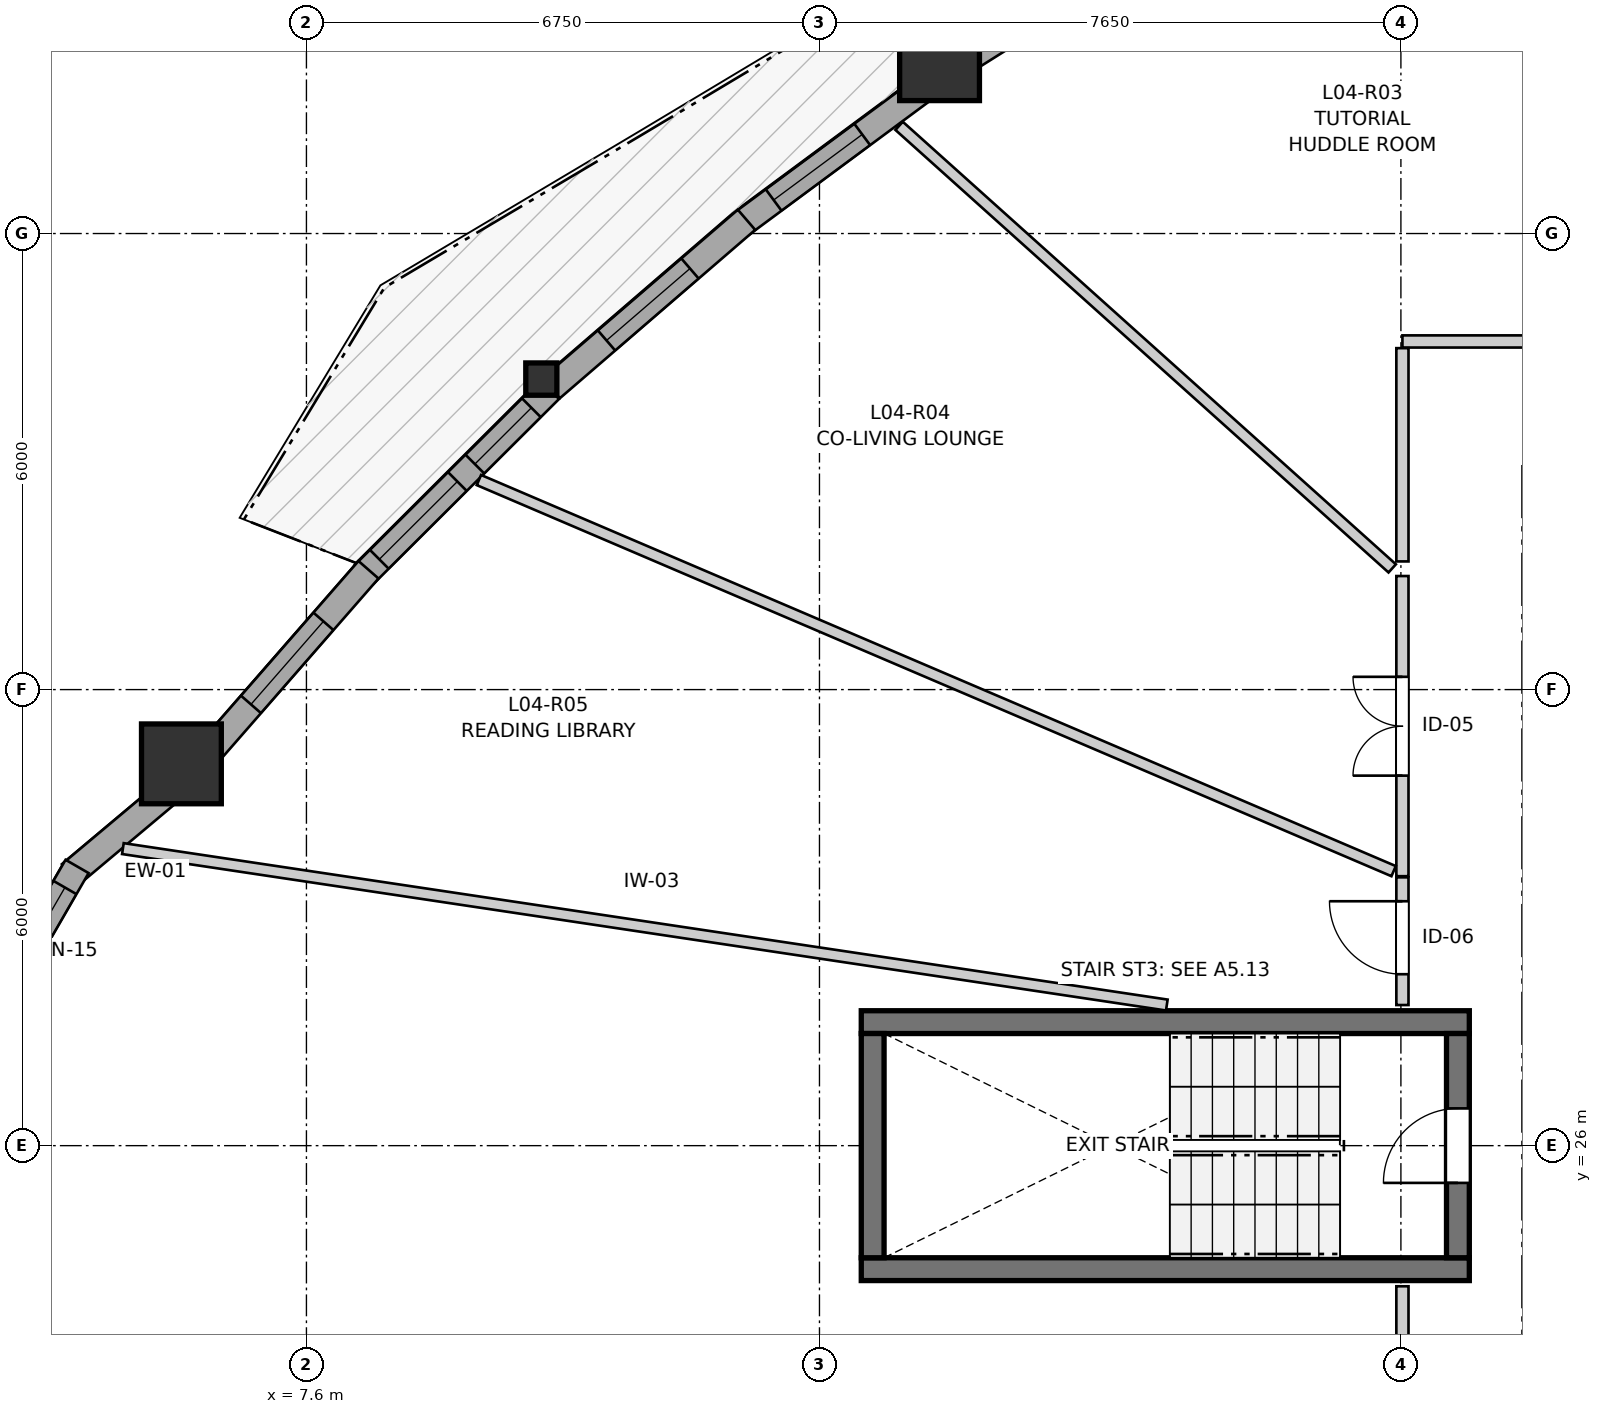
"""IFC4 building model, lengths in metres.
Left out: names, types, materials, properties, quantities, classifications, styles, units other than length and angle.
Written with IfcOpenShell. Run it as: python <this file> out.ifc"""

import sys

from ifc_helpers import new_model, si_unit, direction, frame, frame_2d, origin, origin_2d, place, context, subcontext, project, spatial, rectangle, i_section, extrude, source, transform, mapped, element, fill, save


model = new_model("IFC4")
c1 = context("Model", 3, precision=1e-05, world=origin(), true_north=direction((0.0, 1.0)))
c2 = subcontext(c1, "Body", "Model", "MODEL_VIEW")
j1 = project(units=[si_unit("LENGTHUNIT", "METRE"), si_unit("PLANEANGLEUNIT", "RADIAN")], contexts=[c1])
p1 = place(None, origin())
s1 = spatial("IfcSite", under=j1, at=p1, CompositionType="ELEMENT")
p2 = place(p1, origin())
s2 = spatial("IfcBuilding", under=s1, at=p2, CompositionType="ELEMENT")
p3 = place(p2, frame((0.0, 0.0, 17.4)))
s3 = spatial("IfcBuildingStorey", under=s2, at=p3, CompositionType="ELEMENT", Elevation=17.4)
for number, where, z_axis, x_axis in (
    (1, (14.9, 24.375, 0.0), (0.0, 0.0, 1.0), (1.0, 0.0, 0.0)),
    (2, (22.9, 27.625, 0.0), (0.0, 0.0, 1.0), (-1.0, 0.0, 0.0)),
):
    element("IfcWall", number, at=place(p3, frame(where, z_axis=z_axis, x_axis=x_axis)), inside=s3, PredefinedType="SHEAR", context=c2, shape_type="SweptSolid", body=[
        extrude(rectangle(XDim=8.0, YDim=0.3, at=frame_2d((4.0, 0.0))), origin(), (0.0, 0.0, 1.0), 2.94),
    ])
p4 = place(p3, frame((15.05, 27.475, 0.0), z_axis=(0.0, 0.0, 1.0), x_axis=(0.0, -1.0, 0.0)))
e3 = element("IfcWall", 3, at=p4, inside=s3, PredefinedType="SHEAR", context=c2, shape_type="SweptSolid", body=[
    extrude(rectangle(XDim=2.95, YDim=0.3, at=frame_2d((1.475, 0.0))), origin(), (0.0, 0.0, 1.0), 2.94),
])
p5 = place(p3, frame((22.75, 24.525, 0.0), z_axis=(0.0, 0.0, 1.0), x_axis=(0.0, 1.0, 0.0)))
e4 = element("IfcWall", 4, at=p5, inside=s3, PredefinedType="SHEAR", context=c2, shape_type="SweptSolid", body=[
    extrude(rectangle(XDim=2.95, YDim=0.3, at=frame_2d((1.475, 0.0))), origin(), (0.0, 0.0, 1.0), 2.94),
])
p6 = place(p5, frame((0.985, 0.0, 0.0)))
e5 = element("IfcOpeningElement", 5, at=p6, cuts=e4, PredefinedType="OPENING", context=c2, shape_type="SweptSolid", body=[
    extrude(rectangle(XDim=0.98, YDim=2.15, at=frame_2d((0.49, 1.075))), frame((0.0, 0.16, 0.0), z_axis=(0.0, -1.0, 0.0), x_axis=(1.0, 0.0, 0.0)), (0.0, 0.0, 1.0), 0.32),
])
m1 = source(origin(), c2, "Body", "SweptSolid", [
    extrude(rectangle(XDim=1.05, YDim=1.05, at=origin_2d()), origin(), (0.0, 0.0, 1.0), 2.94),
])
for number, where, z_axis, x_axis in (
    (6, (5.955, 31.023, 0.0), (0.0, 0.0, 1.0), (1.0, 0.0, 0.0)),
    (7, (15.93, 40.274, 0.0), (0.0, 0.0, 1.0), (1.0, 0.0, 0.0)),
):
    element("IfcColumn", number, at=place(p3, frame(where, z_axis=z_axis, x_axis=x_axis)), inside=s3, PredefinedType="COLUMN", context=c2, shape_type="MappedRepresentation", body=[
        mapped(m1, transform((0.0, 0.0, 0.0), x_axis=(1.0, 0.0, 0.0), y_axis=(0.0, 1.0, 0.0), z_axis=(0.0, 0.0, 1.0), scale=1.0)),
    ])
m2 = source(origin(), c2, "Body", "SweptSolid", [
    extrude(i_section(OverallWidth=0.409, OverallDepth=0.425, WebThickness=0.03, FlangeThickness=0.048, FilletRadius=0.015, at=origin_2d()), origin(), (0.0, 0.0, 1.0), 2.94),
])
p7 = place(p3, frame((10.69, 36.085, 0.0), z_axis=(0.0, 0.0, 1.0), x_axis=(1.0, 0.0, 0.0)))
e8 = element("IfcColumn", 8, at=p7, inside=s3, PredefinedType="PILASTER", context=c2, shape_type="MappedRepresentation", body=[
    mapped(m2, transform((0.0, 0.0, 0.0), x_axis=(1.0, 0.0, 0.0), y_axis=(0.0, 1.0, 0.0), z_axis=(0.0, 0.0, 1.0), scale=1.0)),
])
p8 = place(p3, frame((5.838, 30.696, 0.0), z_axis=(0.0, 0.0, 1.0), x_axis=(-0.766001205563, -0.64283913468, 0.0)))
e9 = element("IfcWall", 9, at=p8, inside=s3, PredefinedType="SOLIDWALL", context=c2, shape_type="SweptSolid", body=[
    extrude(rectangle(XDim=1.752, YDim=0.35, at=frame_2d((0.876, 0.0))), origin(), (0.0, 0.0, 1.0), 2.42),
])
p9 = place(p3, frame((4.583, 29.674, 0.0), z_axis=(0.0, 0.0, 1.0), x_axis=(-0.499995423472, -0.866028046028, 0.0)))
e10 = element("IfcWall", 10, at=p9, inside=s3, PredefinedType="SOLIDWALL", context=c2, shape_type="SweptSolid", body=[
    extrude(rectangle(XDim=2.09, YDim=0.35, at=frame_2d((1.045, 0.0))), origin(), (0.0, 0.0, 1.0), 2.42),
])
p10 = place(p9, frame((0.32, 0.0, 0.82)))
e11 = element("IfcOpeningElement", 11, at=p10, cuts=e10, PredefinedType="OPENING", context=c2, shape_type="SweptSolid", body=[
    extrude(rectangle(XDim=1.45, YDim=1.25, at=frame_2d((0.725, 0.625))), frame((0.0, 0.185, 0.0), z_axis=(0.0, -1.0, 0.0), x_axis=(1.0, 0.0, 0.0)), (0.0, 0.0, 1.0), 0.37),
])
p11 = place(p3, frame((3.537, 24.137, 0.0), z_axis=(0.0, 0.0, 1.0), x_axis=(0.499995423472, -0.866028046028, 0.0)))
e12 = element("IfcWall", 12, at=p11, inside=s3, PredefinedType="SOLIDWALL", context=c2, shape_type="SweptSolid", body=[
    extrude(rectangle(XDim=2.09, YDim=0.35, at=frame_2d((1.045, 0.0))), origin(), (0.0, 0.0, 1.0), 2.42),
])
p12 = place(p11, frame((0.32, 0.0, 0.82)))
e13 = element("IfcOpeningElement", 13, at=p12, cuts=e12, PredefinedType="OPENING", context=c2, shape_type="SweptSolid", body=[
    extrude(rectangle(XDim=1.45, YDim=1.25, at=frame_2d((0.725, 0.625))), frame((0.0, 0.185, 0.0), z_axis=(0.0, -1.0, 0.0), x_axis=(1.0, 0.0, 0.0)), (0.0, 0.0, 1.0), 0.37),
])
p13 = place(p3, frame((18.864, 41.913, 0.0), z_axis=(0.0, 0.0, 1.0), x_axis=(-0.84643287852, -0.532495429239, 0.0)))
e14 = element("IfcWall", 14, at=p13, inside=s3, PredefinedType="SOLIDWALL", context=c2, shape_type="SweptSolid", body=[
    extrude(rectangle(XDim=3.056, YDim=0.35, at=frame_2d((1.528, 0.0))), origin(), (0.0, 0.0, 1.0), 2.42),
])
p14 = place(p13, frame((0.808, 0.0, 0.82)))
e15 = element("IfcOpeningElement", 15, at=p14, cuts=e14, PredefinedType="OPENING", context=c2, shape_type="SweptSolid", body=[
    extrude(rectangle(XDim=1.45, YDim=1.25, at=frame_2d((0.725, 0.625))), frame((0.0, 0.185, 0.0), z_axis=(0.0, -1.0, 0.0), x_axis=(1.0, 0.0, 0.0)), (0.0, 0.0, 1.0), 0.37),
])
p15 = place(p3, frame((15.793, 39.955, 0.0), z_axis=(0.0, 0.0, 1.0), x_axis=(-0.803813051054, -0.594881987419, 0.0)))
e16 = element("IfcWall", 16, at=p15, inside=s3, PredefinedType="SOLIDWALL", context=c2, shape_type="SweptSolid", body=[
    extrude(rectangle(XDim=3.075, YDim=0.35, at=frame_2d((1.538, 0.0))), origin(), (0.0, 0.0, 1.0), 2.42),
])
p16 = place(p15, frame((1.095, 0.0, 0.82)))
e17 = element("IfcOpeningElement", 17, at=p16, cuts=e16, PredefinedType="OPENING", context=c2, shape_type="SweptSolid", body=[
    extrude(rectangle(XDim=1.45, YDim=1.25, at=frame_2d((0.725, 0.625))), frame((0.0, 0.185, 0.0), z_axis=(0.0, -1.0, 0.0), x_axis=(1.0, 0.0, 0.0)), (0.0, 0.0, 1.0), 0.37),
])
p17 = place(p3, frame((13.39, 38.181, 0.0), z_axis=(0.0, 0.0, 1.0), x_axis=(-0.757476213352, -0.652862762153, 0.0)))
e18 = element("IfcWall", 18, at=p17, inside=s3, PredefinedType="SOLIDWALL", context=c2, shape_type="SweptSolid", body=[
    extrude(rectangle(XDim=3.393, YDim=0.35, at=frame_2d((1.697, 0.0))), origin(), (0.0, 0.0, 1.0), 2.42),
])
p18 = place(p17, frame((0.982, 0.0, 0.82)))
e19 = element("IfcOpeningElement", 19, at=p18, cuts=e18, PredefinedType="OPENING", context=c2, shape_type="SweptSolid", body=[
    extrude(rectangle(XDim=1.45, YDim=1.25, at=frame_2d((0.725, 0.625))), frame((0.0, 0.185, 0.0), z_axis=(0.0, -1.0, 0.0), x_axis=(1.0, 0.0, 0.0)), (0.0, 0.0, 1.0), 0.37),
])
p19 = place(p3, frame((10.8, 35.947, 0.0), z_axis=(0.0, 0.0, 1.0), x_axis=(-0.708379570295, -0.705831696928, 0.0)))
e20 = element("IfcWall", 20, at=p19, inside=s3, PredefinedType="SOLIDWALL", context=c2, shape_type="SweptSolid", body=[
    extrude(rectangle(XDim=3.449, YDim=0.35, at=frame_2d((1.725, 0.0))), origin(), (0.0, 0.0, 1.0), 2.42),
])
p20 = place(p19, frame((0.339, 0.0, 0.82)))
e21 = element("IfcOpeningElement", 21, at=p20, cuts=e20, PredefinedType="OPENING", context=c2, shape_type="SweptSolid", body=[
    extrude(rectangle(XDim=1.05, YDim=1.45, at=frame_2d((0.525, 0.725))), frame((0.0, 0.185, 0.0), z_axis=(0.0, -1.0, 0.0), x_axis=(1.0, 0.0, 0.0)), (0.0, 0.0, 1.0), 0.37),
])
p21 = place(p19, frame((1.713, 0.0, 0.82)))
e22 = element("IfcOpeningElement", 22, at=p21, cuts=e20, PredefinedType="OPENING", context=c2, shape_type="SweptSolid", body=[
    extrude(rectangle(XDim=1.45, YDim=1.25, at=frame_2d((0.725, 0.625))), frame((0.0, 0.185, 0.0), z_axis=(0.0, -1.0, 0.0), x_axis=(1.0, 0.0, 0.0)), (0.0, 0.0, 1.0), 0.37),
])
p22 = place(p3, frame((8.417, 33.577, 0.0), z_axis=(0.0, 0.0, 1.0), x_axis=(-0.657597964565, -0.75336904436, 0.0)))
e23 = element("IfcWall", 23, at=p22, inside=s3, PredefinedType="SOLIDWALL", context=c2, shape_type="SweptSolid", body=[
    extrude(rectangle(XDim=3.243, YDim=0.35, at=frame_2d((1.621, 0.0))), origin(), (0.0, 0.0, 1.0), 2.42),
])
p23 = place(p22, frame((0.901, 0.0, 0.82)))
e24 = element("IfcOpeningElement", 24, at=p23, cuts=e23, PredefinedType="OPENING", context=c2, shape_type="SweptSolid", body=[
    extrude(rectangle(XDim=1.45, YDim=1.25, at=frame_2d((0.725, 0.625))), frame((0.0, 0.185, 0.0), z_axis=(0.0, -1.0, 0.0), x_axis=(1.0, 0.0, 0.0)), (0.0, 0.0, 1.0), 0.37),
])
p24 = place(p3, frame((22.02, 16.616, 0.0), z_axis=(0.0, 0.0, 1.0), x_axis=(0.0, 1.0, 0.0)))
e25 = element("IfcWall", 25, at=p24, inside=s3, PredefinedType="PARTITIONING", context=c2, shape_type="SweptSolid", body=[
    extrude(rectangle(XDim=7.534, YDim=0.16, at=frame_2d((3.767, 0.0))), origin(), (0.0, 0.0, 1.0), 2.94),
])
p25 = place(p24, frame((2.98, 0.0, 0.0)))
e26 = element("IfcOpeningElement", 26, at=p25, cuts=e25, PredefinedType="OPENING", context=c2, shape_type="SweptSolid", body=[
    extrude(rectangle(XDim=1.3, YDim=2.1, at=frame_2d((0.65, 1.05))), frame((0.0, 0.09, 0.0), z_axis=(0.0, -1.0, 0.0), x_axis=(1.0, 0.0, 0.0)), (0.0, 0.0, 1.0), 0.18),
])
p26 = place(p3, frame((22.02, 36.58, 0.0), z_axis=(0.0, 0.0, 1.0), x_axis=(1.0, 0.0, 0.0)))
e27 = element("IfcWall", 27, at=p26, inside=s3, PredefinedType="PARTITIONING", context=c2, shape_type="SweptSolid", body=[
    extrude(rectangle(XDim=4.874, YDim=0.16, at=frame_2d((2.437, 0.0))), origin(), (0.0, 0.0, 1.0), 2.548),
])
p27 = place(p26, frame((1.779, 0.0, 0.0)))
e28 = element("IfcOpeningElement", 28, at=p27, cuts=e27, PredefinedType="OPENING", context=c2, shape_type="SweptSolid", body=[
    extrude(rectangle(XDim=1.3, YDim=2.1, at=frame_2d((0.65, 1.05))), frame((0.0, 0.09, 0.0), z_axis=(0.0, -1.0, 0.0), x_axis=(1.0, 0.0, 0.0)), (0.0, 0.0, 1.0), 0.18),
])
p28 = place(p3, frame((22.02, 29.545, 0.0), z_axis=(0.0, 0.0, 1.0), x_axis=(0.0, 1.0, 0.0)))
e29 = element("IfcWall", 29, at=p28, inside=s3, PredefinedType="PARTITIONING", context=c2, shape_type="SweptSolid", body=[
    extrude(rectangle(XDim=3.949, YDim=0.16, at=frame_2d((1.975, 0.0))), origin(), (0.0, 0.0, 1.0), 2.94),
])
p29 = place(p28, frame((1.323, 0.0, 0.0)))
e30 = element("IfcOpeningElement", 30, at=p29, cuts=e29, PredefinedType="OPENING", context=c2, shape_type="SweptSolid", body=[
    extrude(rectangle(XDim=1.3, YDim=2.1, at=frame_2d((0.65, 1.05))), frame((0.0, 0.09, 0.0), z_axis=(0.0, -1.0, 0.0), x_axis=(1.0, 0.0, 0.0)), (0.0, 0.0, 1.0), 0.18),
])
p30 = place(p3, frame((22.02, 27.85, 0.0), z_axis=(0.0, 0.0, 1.0), x_axis=(0.0, 1.0, 0.0)))
e31 = element("IfcWall", 31, at=p30, inside=s3, PredefinedType="PARTITIONING", context=c2, shape_type="SweptSolid", body=[
    extrude(rectangle(XDim=1.68, YDim=0.16, at=frame_2d((0.84, 0.0))), origin(), (0.0, 0.0, 1.0), 2.94),
])
p31 = place(p30, frame((0.406, 0.0, 0.0)))
e32 = element("IfcOpeningElement", 32, at=p31, cuts=e31, PredefinedType="OPENING", context=c2, shape_type="SweptSolid", body=[
    extrude(rectangle(XDim=0.96, YDim=2.1, at=frame_2d((0.48, 1.05))), frame((0.0, 0.09, 0.0), z_axis=(0.0, -1.0, 0.0), x_axis=(1.0, 0.0, 0.0)), (0.0, 0.0, 1.0), 0.18),
])
p32 = place(p3, frame((5.185, 29.908, 0.0), z_axis=(0.0, 0.0, 1.0), x_axis=(0.988958777333, -0.148190879394, 0.0)))
e33 = element("IfcWall", 33, at=p32, inside=s3, PredefinedType="PARTITIONING", context=c2, shape_type="SweptSolid", body=[
    extrude(rectangle(XDim=13.888, YDim=0.145, at=frame_2d((6.944, 0.0))), origin(), (0.0, 0.0, 1.0), 2.94),
])
p33 = place(p3, frame((9.869, 34.757, 0.0), z_axis=(0.0, 0.0, 1.0), x_axis=(0.919492001568, -0.393108711493, 0.0)))
e34 = element("IfcWall", 34, at=p33, inside=s3, PredefinedType="PARTITIONING", context=c2, shape_type="SweptSolid", body=[
    extrude(rectangle(XDim=13.089, YDim=0.145, at=frame_2d((6.544, 0.0))), origin(), (0.0, 0.0, 1.0), 2.94),
])
p34 = place(p3, frame((15.398, 39.417, 0.0), z_axis=(0.0, 0.0, 1.0), x_axis=(0.744248709075, -0.667902581998, 0.0)))
e35 = element("IfcWall", 35, at=p34, inside=s3, PredefinedType="PARTITIONING", context=c2, shape_type="SweptSolid", body=[
    extrude(rectangle(XDim=8.717, YDim=0.145, at=frame_2d((4.359, 0.0))), origin(), (0.0, 0.0, 1.0), 2.94),
])
p35 = place(p3, frame((22.02, 33.686, 0.0), z_axis=(0.0, 0.0, 1.0), x_axis=(0.0, 1.0, 0.0)))
e36 = element("IfcWall", 36, at=p35, inside=s3, PredefinedType="PARTITIONING", context=c2, shape_type="SweptSolid", body=[
    extrude(rectangle(XDim=2.806, YDim=0.16, at=frame_2d((1.403, 0.0))), origin(), (0.0, 0.0, 1.0), 2.94),
])
m3 = source(origin(), c2, "Body", "SweptSolid", [
    extrude(rectangle(XDim=1.45, YDim=1.25, at=frame_2d((0.725, 0.625))), frame((0.0, 0.03, 0.0), z_axis=(0.0, -1.0, 0.0), x_axis=(1.0, 0.0, 0.0)), (0.0, 0.0, 1.0), 0.06),
])
p36 = place(p10, origin())
e37 = element("IfcWindow", 37, at=p36, inside=s3, PartitioningType="SINGLE_PANEL", PredefinedType="WINDOW", context=c2, shape_type="MappedRepresentation", body=[
    mapped(m3, transform((0.0, 0.0, 0.0), x_axis=(1.0, 0.0, 0.0), y_axis=(0.0, 1.0, 0.0), z_axis=(0.0, 0.0, 1.0), scale=1.0)),
])
fill(e11, e37)
p37 = place(p12, origin())
e38 = element("IfcWindow", 38, at=p37, inside=s3, PartitioningType="SINGLE_PANEL", PredefinedType="WINDOW", context=c2, shape_type="MappedRepresentation", body=[
    mapped(m3, transform((0.0, 0.0, 0.0), x_axis=(1.0, 0.0, 0.0), y_axis=(0.0, 1.0, 0.0), z_axis=(0.0, 0.0, 1.0), scale=1.0)),
])
fill(e13, e38)
p38 = place(p16, origin())
e39 = element("IfcWindow", 39, at=p38, inside=s3, PartitioningType="SINGLE_PANEL", PredefinedType="WINDOW", context=c2, shape_type="MappedRepresentation", body=[
    mapped(m3, transform((0.0, 0.0, 0.0), x_axis=(1.0, 0.0, 0.0), y_axis=(0.0, 1.0, 0.0), z_axis=(0.0, 0.0, 1.0), scale=1.0)),
])
fill(e17, e39)
p39 = place(p18, origin())
e40 = element("IfcWindow", 40, at=p39, inside=s3, PartitioningType="SINGLE_PANEL", PredefinedType="WINDOW", context=c2, shape_type="MappedRepresentation", body=[
    mapped(m3, transform((0.0, 0.0, 0.0), x_axis=(1.0, 0.0, 0.0), y_axis=(0.0, 1.0, 0.0), z_axis=(0.0, 0.0, 1.0), scale=1.0)),
])
fill(e19, e40)
m4 = source(origin(), c2, "Body", "SweptSolid", [
    extrude(rectangle(XDim=1.05, YDim=1.45, at=frame_2d((0.525, 0.725))), frame((0.0, 0.03, 0.0), z_axis=(0.0, -1.0, 0.0), x_axis=(1.0, 0.0, 0.0)), (0.0, 0.0, 1.0), 0.06),
])
p40 = place(p20, origin())
e41 = element("IfcWindow", 41, at=p40, inside=s3, PartitioningType="SINGLE_PANEL", PredefinedType="WINDOW", context=c2, shape_type="MappedRepresentation", body=[
    mapped(m4, transform((0.0, 0.0, 0.0), x_axis=(1.0, 0.0, 0.0), y_axis=(0.0, 1.0, 0.0), z_axis=(0.0, 0.0, 1.0), scale=1.0)),
])
fill(e21, e41)
p41 = place(p21, origin())
e42 = element("IfcWindow", 42, at=p41, inside=s3, PartitioningType="SINGLE_PANEL", PredefinedType="WINDOW", context=c2, shape_type="MappedRepresentation", body=[
    mapped(m3, transform((0.0, 0.0, 0.0), x_axis=(1.0, 0.0, 0.0), y_axis=(0.0, 1.0, 0.0), z_axis=(0.0, 0.0, 1.0), scale=1.0)),
])
fill(e22, e42)
p42 = place(p23, origin())
e43 = element("IfcWindow", 43, at=p42, inside=s3, PartitioningType="SINGLE_PANEL", PredefinedType="WINDOW", context=c2, shape_type="MappedRepresentation", body=[
    mapped(m3, transform((0.0, 0.0, 0.0), x_axis=(1.0, 0.0, 0.0), y_axis=(0.0, 1.0, 0.0), z_axis=(0.0, 0.0, 1.0), scale=1.0)),
])
fill(e24, e43)
m5 = source(origin(), c2, "Body", "SweptSolid", [
    extrude(rectangle(XDim=0.98, YDim=2.15, at=frame_2d((0.49, 1.075))), frame((0.0, 0.025, 0.0), z_axis=(0.0, -1.0, 0.0), x_axis=(1.0, 0.0, 0.0)), (0.0, 0.0, 1.0), 0.05),
])
p43 = place(p6, origin())
e44 = element("IfcDoor", 44, at=p43, inside=s3, OperationType="SINGLE_SWING_LEFT", PredefinedType="DOOR", context=c2, shape_type="MappedRepresentation", body=[
    mapped(m5, transform((0.0, 0.0, 0.0), x_axis=(1.0, 0.0, 0.0), y_axis=(0.0, 1.0, 0.0), z_axis=(0.0, 0.0, 1.0), scale=1.0)),
])
fill(e5, e44)
m6 = source(origin(), c2, "Body", "SweptSolid", [
    extrude(rectangle(XDim=1.3, YDim=2.1, at=frame_2d((0.65, 1.05))), frame((0.0, 0.025, 0.0), z_axis=(0.0, -1.0, 0.0), x_axis=(1.0, 0.0, 0.0)), (0.0, 0.0, 1.0), 0.05),
])
p44 = place(p29, origin())
e45 = element("IfcDoor", 45, at=p44, inside=s3, OperationType="DOUBLE_DOOR_SINGLE_SWING", PredefinedType="DOOR", context=c2, shape_type="MappedRepresentation", body=[
    mapped(m6, transform((0.0, 0.0, 0.0), x_axis=(1.0, 0.0, 0.0), y_axis=(0.0, 1.0, 0.0), z_axis=(0.0, 0.0, 1.0), scale=1.0)),
])
fill(e30, e45)
m7 = source(origin(), c2, "Body", "SweptSolid", [
    extrude(rectangle(XDim=0.96, YDim=2.1, at=frame_2d((0.48, 1.05))), frame((0.0, 0.025, 0.0), z_axis=(0.0, -1.0, 0.0), x_axis=(1.0, 0.0, 0.0)), (0.0, 0.0, 1.0), 0.05),
])
p45 = place(p31, origin())
e46 = element("IfcDoor", 46, at=p45, inside=s3, OperationType="SINGLE_SWING_RIGHT", PredefinedType="DOOR", context=c2, shape_type="MappedRepresentation", body=[
    mapped(m7, transform((0.0, 0.0, 0.0), x_axis=(1.0, 0.0, 0.0), y_axis=(0.0, 1.0, 0.0), z_axis=(0.0, 0.0, 1.0), scale=1.0)),
])
fill(e32, e46)
save(model, sys.argv[1])
